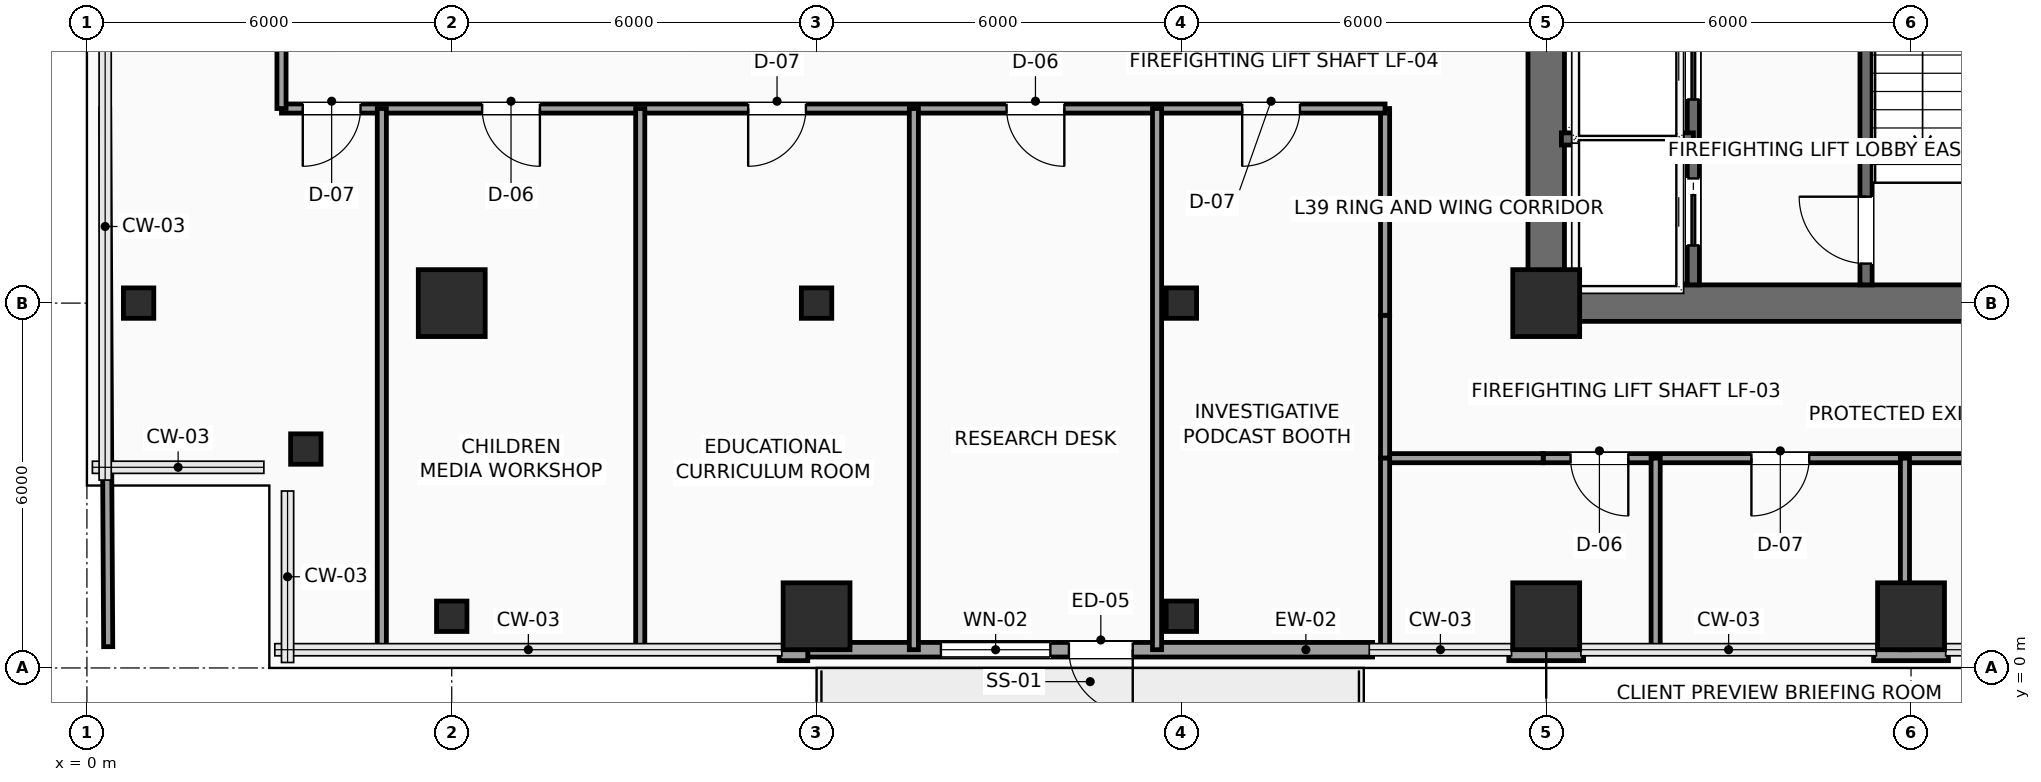
"""IFC4 building model, lengths in metres.
Left out: names, types, materials, properties, quantities, classifications, styles, units other than length and angle.
Written with IfcOpenShell. Run it as: python <this file> out.ifc"""

import sys

from ifc_helpers import new_model, si_unit, direction, frame, frame_2d, origin, origin_2d, place, context, subcontext, project, spatial, rectangle, hollow_rectangle, extrude, element, fill, save


model = new_model("IFC4")
c1 = context("Model", 3, precision=1e-05, world=origin(), true_north=direction((0.0, 1.0)))
c2 = subcontext(c1, "Body", "Model", "MODEL_VIEW")
j1 = project(units=[si_unit("LENGTHUNIT", "METRE"), si_unit("PLANEANGLEUNIT", "RADIAN")], contexts=[c1])
p1 = place(None, origin())
s1 = spatial("IfcSite", under=j1, at=p1, CompositionType="ELEMENT")
p2 = place(p1, origin())
s2 = spatial("IfcBuilding", under=s1, at=p2, CompositionType="ELEMENT")
p3 = place(p2, frame((0.0, 0.0, 160.65)))
s3 = spatial("IfcBuildingStorey", under=s2, at=p3, CompositionType="ELEMENT", Elevation=160.65)
p4 = place(p3, frame((24.0, 6.0, 0.0), z_axis=(0.0, 0.0, 1.0), x_axis=(1.0, 0.0, 0.0)))
e1 = element("IfcColumn", 1, at=p4, inside=s3, PredefinedType="COLUMN", context=c2, shape_type="SweptSolid", body=[
    extrude(rectangle(XDim=1.1, YDim=1.1, at=origin_2d()), origin(), (0.0, 0.0, 1.0), 3.75),
])
for number, where, z_axis, x_axis in (
    (2, (3.6, 3.6, 0.0), (0.0, 0.0, 1.0), (1.0, 0.0, 0.0)),
    (3, (0.85, 6.0, 0.0), (0.0, 0.0, 1.0), (1.0, 0.0, 0.0)),
    (4, (6.0, 0.85, 0.0), (0.0, 0.0, 1.0), (1.0, 0.0, 0.0)),
):
    element("IfcColumn", number, at=place(p3, frame(where, z_axis=z_axis, x_axis=x_axis)), inside=s3, PredefinedType="COLUMN", context=c2, shape_type="SweptSolid", body=[
        extrude(hollow_rectangle(XDim=0.5, YDim=0.5, WallThickness=0.025, InnerFilletRadius=0.025, OuterFilletRadius=0.04, at=origin_2d()), origin(), (0.0, 0.0, 1.0), 3.75),
    ])
for number, where, z_axis, x_axis in (
    (5, (6.0, 6.0, 0.0), (0.0, 0.0, 1.0), (1.0, 0.0, 0.0)),
    (6, (12.0, 0.85, 0.0), (0.0, 0.0, 1.0), (1.0, 0.0, 0.0)),
):
    element("IfcColumn", number, at=place(p3, frame(where, z_axis=z_axis, x_axis=x_axis)), inside=s3, PredefinedType="COLUMN", context=c2, shape_type="SweptSolid", body=[
        extrude(rectangle(XDim=1.1, YDim=1.1, at=origin_2d()), origin(), (0.0, 0.0, 1.0), 3.75),
    ])
for number, where, z_axis, x_axis in (
    (7, (12.0, 6.0, 0.0), (0.0, 0.0, 1.0), (1.0, 0.0, 0.0)),
    (8, (18.0, 0.85, 0.0), (0.0, 0.0, 1.0), (1.0, 0.0, 0.0)),
    (9, (18.0, 6.0, 0.0), (0.0, 0.0, 1.0), (1.0, 0.0, 0.0)),
):
    element("IfcColumn", number, at=place(p3, frame(where, z_axis=z_axis, x_axis=x_axis)), inside=s3, PredefinedType="COLUMN", context=c2, shape_type="SweptSolid", body=[
        extrude(hollow_rectangle(XDim=0.5, YDim=0.5, WallThickness=0.025, InnerFilletRadius=0.025, OuterFilletRadius=0.04, at=origin_2d()), origin(), (0.0, 0.0, 1.0), 3.75),
    ])
for number, where, z_axis, x_axis in (
    (10, (24.0, 0.85, 0.0), (0.0, 0.0, 1.0), (1.0, 0.0, 0.0)),
    (11, (30.0, 0.85, 0.0), (0.0, 0.0, 1.0), (1.0, 0.0, 0.0)),
):
    element("IfcColumn", number, at=place(p3, frame(where, z_axis=z_axis, x_axis=x_axis)), inside=s3, PredefinedType="COLUMN", context=c2, shape_type="SweptSolid", body=[
        extrude(rectangle(XDim=1.1, YDim=1.1, at=origin_2d()), origin(), (0.0, 0.0, 1.0), 3.75),
    ])
p5 = place(p3, frame((21.145, 0.3, 0.0), z_axis=(0.0, 0.0, 1.0), x_axis=(-1.0, 0.0, 0.0)))
e12 = element("IfcWall", 12, at=p5, inside=s3, PredefinedType="SOLIDWALL", context=c2, shape_type="SweptSolid", body=[
    extrude(rectangle(XDim=9.29, YDim=0.24, at=frame_2d((4.645, 0.0))), origin(), (0.0, 0.0, 1.0), 3.425),
])
p6 = place(p5, frame((3.945, 0.0, 0.0)))
e13 = element("IfcOpeningElement", 13, at=p6, cuts=e12, PredefinedType="OPENING", context=c2, shape_type="SweptSolid", body=[
    extrude(rectangle(XDim=1.05, YDim=2.2, at=frame_2d((0.525, 1.1))), frame((0.0, 0.13, 0.0), z_axis=(0.0, -1.0, 0.0), x_axis=(1.0, 0.0, 0.0)), (0.0, 0.0, 1.0), 0.26),
])
p7 = place(p5, frame((5.3, 0.0, 0.85)))
e14 = element("IfcOpeningElement", 14, at=p7, cuts=e12, PredefinedType="OPENING", context=c2, shape_type="SweptSolid", body=[
    extrude(rectangle(XDim=1.8, YDim=2.1, at=frame_2d((0.9, 1.05))), frame((0.0, 0.13, 0.0), z_axis=(0.0, -1.0, 0.0), x_axis=(1.0, 0.0, 0.0)), (0.0, 0.0, 1.0), 0.26),
])
for number, where, z_axis, x_axis in (
    (15, (30.615, 0.24, 0.0), (0.0, 0.0, 1.0), (-1.0, 0.0, 0.0)),
    (16, (24.615, 0.24, 0.0), (0.0, 0.0, 1.0), (-1.0, 0.0, 0.0)),
):
    element("IfcWall", number, at=place(p3, frame(where, z_axis=z_axis, x_axis=x_axis)), inside=s3, PredefinedType="SOLIDWALL", context=c2, shape_type="SweptSolid", body=[
        extrude(rectangle(XDim=1.23, YDim=0.24, at=frame_2d((0.615, 0.0))), origin(), (0.0, 0.0, 1.0), 3.425),
    ])
p8 = place(p3, frame((11.855, 0.24, 0.0), z_axis=(0.0, 0.0, 1.0), x_axis=(-1.0, 0.0, 0.0)))
e17 = element("IfcWall", 17, at=p8, inside=s3, PredefinedType="SOLIDWALL", context=c2, shape_type="SweptSolid", body=[
    extrude(rectangle(XDim=0.47, YDim=0.24, at=frame_2d((0.235, 0.0))), origin(), (0.0, 0.0, 1.0), 3.425),
])
p9 = place(p3, frame((24.0, 6.0, 0.0), z_axis=(0.0, 0.0, 1.0), x_axis=(1.0, 0.0, 0.0)))
e18 = element("IfcWall", 18, at=p9, inside=s3, PredefinedType="SHEAR", context=c2, shape_type="SweptSolid", body=[
    extrude(rectangle(XDim=9.6, YDim=0.6, at=frame_2d((4.8, 0.0))), origin(), (0.0, 0.0, 1.0), 3.425),
])
p10 = place(p3, frame((24.0, 6.0, 0.0), z_axis=(0.0, 0.0, 1.0), x_axis=(0.0, 1.0, 0.0)))
e19 = element("IfcWall", 19, at=p10, inside=s3, PredefinedType="SHEAR", context=c2, shape_type="SweptSolid", body=[
    extrude(rectangle(XDim=12.0, YDim=0.6, at=frame_2d((6.0, 0.0))), origin(), (0.0, 0.0, 1.0), 3.425),
])
p11 = place(p10, frame((7.15, 0.0, 0.0)))
e20 = element("IfcOpeningElement", 20, at=p11, cuts=e19, PredefinedType="OPENING", context=c2, shape_type="SweptSolid", body=[
    extrude(rectangle(XDim=1.6, YDim=2.3, at=frame_2d((0.8, 1.15))), frame((0.0, 0.31, 0.0), z_axis=(0.0, -1.0, 0.0), x_axis=(1.0, 0.0, 0.0)), (0.0, 0.0, 1.0), 0.62),
])
p12 = place(p3, frame((29.26, 6.3, 0.0), z_axis=(0.0, 0.0, 1.0), x_axis=(0.0, 1.0, 0.0)))
e21 = element("IfcWall", 21, at=p12, inside=s3, PredefinedType="SHEAR", context=c2, shape_type="SweptSolid", body=[
    extrude(rectangle(XDim=8.88, YDim=0.2, at=frame_2d((4.44, 0.0))), origin(), (0.0, 0.0, 1.0), 3.425),
])
p13 = place(p12, frame((0.35, 0.0, 0.0)))
e22 = element("IfcOpeningElement", 22, at=p13, cuts=e21, PredefinedType="OPENING", context=c2, shape_type="SweptSolid", body=[
    extrude(rectangle(XDim=1.1, YDim=2.2, at=frame_2d((0.55, 1.1))), frame((0.0, 0.11, 0.0), z_axis=(0.0, -1.0, 0.0), x_axis=(1.0, 0.0, 0.0)), (0.0, 0.0, 1.0), 0.22),
])
p14 = place(p3, frame((26.42, 6.3, 0.0), z_axis=(0.0, 0.0, 1.0), x_axis=(0.0, 1.0, 0.0)))
e23 = element("IfcWall", 23, at=p14, inside=s3, PredefinedType="SHEAR", context=c2, shape_type="SweptSolid", body=[
    extrude(rectangle(XDim=4.95, YDim=0.2, at=frame_2d((2.475, 0.0))), origin(), (0.0, 0.0, 1.0), 3.425),
])
p15 = place(p14, frame((0.65, 0.0, 0.0)))
e24 = element("IfcOpeningElement", 24, at=p15, cuts=e23, PredefinedType="OPENING", context=c2, shape_type="SweptSolid", body=[
    extrude(rectangle(XDim=1.1, YDim=2.2, at=frame_2d((0.55, 1.1))), frame((0.0, 0.11, 0.0), z_axis=(0.0, -1.0, 0.0), x_axis=(1.0, 0.0, 0.0)), (0.0, 0.0, 1.0), 0.22),
])
p16 = place(p14, frame((3.05, 0.0, 0.0)))
e25 = element("IfcOpeningElement", 25, at=p16, cuts=e23, PredefinedType="OPENING", context=c2, shape_type="SweptSolid", body=[
    extrude(rectangle(XDim=1.1, YDim=2.2, at=frame_2d((0.55, 1.1))), frame((0.0, 0.11, 0.0), z_axis=(0.0, -1.0, 0.0), x_axis=(1.0, 0.0, 0.0)), (0.0, 0.0, 1.0), 0.22),
])
p17 = place(p3, frame((24.25, 8.7, 0.0), z_axis=(0.0, 0.0, 1.0), x_axis=(1.0, 0.0, 0.0)))
e26 = element("IfcWall", 26, at=p17, inside=s3, PredefinedType="SHEAR", context=c2, shape_type="SweptSolid", body=[
    extrude(rectangle(XDim=2.17, YDim=0.2, at=frame_2d((1.085, 0.0))), origin(), (0.0, 0.0, 1.0), 3.425),
])
p18 = place(p3, frame((36.15, 3.45, 0.0), z_axis=(0.0, 0.0, 1.0), x_axis=(-1.0, 0.0, 0.0)))
e27 = element("IfcWall", 27, at=p18, inside=s3, PredefinedType="PARTITIONING", context=c2, shape_type="SweptSolid", body=[
    extrude(rectangle(XDim=12.2, YDim=0.15, at=frame_2d((6.1, 0.0))), origin(), (0.0, 0.0, 1.0), 2.967),
])
p19 = place(p18, frame((10.8, 0.0, 0.0)))
e28 = element("IfcOpeningElement", 28, at=p19, cuts=e27, PredefinedType="OPENING", context=c2, shape_type="SweptSolid", body=[
    extrude(rectangle(XDim=0.95, YDim=2.15, at=frame_2d((0.475, 1.075))), frame((0.0, 0.085, 0.0), z_axis=(0.0, -1.0, 0.0), x_axis=(1.0, 0.0, 0.0)), (0.0, 0.0, 1.0), 0.17),
])
p20 = place(p18, frame((7.825, 0.0, 0.0)))
e29 = element("IfcOpeningElement", 29, at=p20, cuts=e27, PredefinedType="OPENING", context=c2, shape_type="SweptSolid", body=[
    extrude(rectangle(XDim=0.95, YDim=2.15, at=frame_2d((0.475, 1.075))), frame((0.0, 0.085, 0.0), z_axis=(0.0, -1.0, 0.0), x_axis=(1.0, 0.0, 0.0)), (0.0, 0.0, 1.0), 0.17),
])
p21 = place(p18, frame((3.675, 0.0, 0.0)))
e30 = element("IfcOpeningElement", 30, at=p21, cuts=e27, PredefinedType="OPENING", context=c2, shape_type="SweptSolid", body=[
    extrude(rectangle(XDim=0.95, YDim=2.15, at=frame_2d((0.475, 1.075))), frame((0.0, 0.085, 0.0), z_axis=(0.0, -1.0, 0.0), x_axis=(1.0, 0.0, 0.0)), (0.0, 0.0, 1.0), 0.17),
])
p22 = place(p3, frame((23.95, 3.45, 0.0), z_axis=(0.0, 0.0, 1.0), x_axis=(-1.0, 0.0, 0.0)))
e31 = element("IfcWall", 31, at=p22, inside=s3, PredefinedType="PARTITIONING", context=c2, shape_type="SweptSolid", body=[
    extrude(rectangle(XDim=2.6, YDim=0.15, at=frame_2d((1.3, 0.0))), origin(), (0.0, 0.0, 1.0), 2.967),
])
p23 = place(p3, frame((21.35, 3.45, 0.0), z_axis=(0.0, 0.0, 1.0), x_axis=(0.0, 1.0, 0.0)))
e32 = element("IfcWall", 32, at=p23, inside=s3, PredefinedType="PARTITIONING", context=c2, shape_type="SweptSolid", body=[
    extrude(rectangle(XDim=2.35, YDim=0.15, at=frame_2d((1.175, 0.0))), origin(), (0.0, 0.0, 1.0), 3.425),
])
p24 = place(p3, frame((21.35, 5.8, 0.0), z_axis=(0.0, 0.0, 1.0), x_axis=(0.0, 1.0, 0.0)))
e33 = element("IfcWall", 33, at=p24, inside=s3, PredefinedType="PARTITIONING", context=c2, shape_type="SweptSolid", body=[
    extrude(rectangle(XDim=3.4, YDim=0.15, at=frame_2d((1.7, 0.0))), origin(), (0.0, 0.0, 1.0), 3.425),
])
p25 = place(p3, frame((21.35, 9.2, 0.0), z_axis=(0.0, 0.0, 1.0), x_axis=(-1.0, 0.0, 0.0)))
e34 = element("IfcWall", 34, at=p25, inside=s3, PredefinedType="PARTITIONING", context=c2, shape_type="SweptSolid", body=[
    extrude(rectangle(XDim=18.15, YDim=0.15, at=frame_2d((9.075, 0.0))), origin(), (0.0, 0.0, 1.0), 2.967),
])
p26 = place(p25, frame((16.85, 0.0, 0.0)))
e35 = element("IfcOpeningElement", 35, at=p26, cuts=e34, PredefinedType="OPENING", context=c2, shape_type="SweptSolid", body=[
    extrude(rectangle(XDim=0.95, YDim=2.15, at=frame_2d((0.475, 1.075))), frame((0.0, 0.085, 0.0), z_axis=(0.0, -1.0, 0.0), x_axis=(1.0, 0.0, 0.0)), (0.0, 0.0, 1.0), 0.17),
])
p27 = place(p25, frame((13.9, 0.0, 0.0)))
e36 = element("IfcOpeningElement", 36, at=p27, cuts=e34, PredefinedType="OPENING", context=c2, shape_type="SweptSolid", body=[
    extrude(rectangle(XDim=0.95, YDim=2.15, at=frame_2d((0.475, 1.075))), frame((0.0, 0.085, 0.0), z_axis=(0.0, -1.0, 0.0), x_axis=(1.0, 0.0, 0.0)), (0.0, 0.0, 1.0), 0.17),
])
p28 = place(p25, frame((9.525, 0.0, 0.0)))
e37 = element("IfcOpeningElement", 37, at=p28, cuts=e34, PredefinedType="OPENING", context=c2, shape_type="SweptSolid", body=[
    extrude(rectangle(XDim=0.95, YDim=2.15, at=frame_2d((0.475, 1.075))), frame((0.0, 0.085, 0.0), z_axis=(0.0, -1.0, 0.0), x_axis=(1.0, 0.0, 0.0)), (0.0, 0.0, 1.0), 0.17),
])
p29 = place(p25, frame((5.275, 0.0, 0.0)))
e38 = element("IfcOpeningElement", 38, at=p29, cuts=e34, PredefinedType="OPENING", context=c2, shape_type="SweptSolid", body=[
    extrude(rectangle(XDim=0.95, YDim=2.15, at=frame_2d((0.475, 1.075))), frame((0.0, 0.085, 0.0), z_axis=(0.0, -1.0, 0.0), x_axis=(1.0, 0.0, 0.0)), (0.0, 0.0, 1.0), 0.17),
])
p30 = place(p25, frame((1.4, 0.0, 0.0)))
e39 = element("IfcOpeningElement", 39, at=p30, cuts=e34, PredefinedType="OPENING", context=c2, shape_type="SweptSolid", body=[
    extrude(rectangle(XDim=0.95, YDim=2.15, at=frame_2d((0.475, 1.075))), frame((0.0, 0.085, 0.0), z_axis=(0.0, -1.0, 0.0), x_axis=(1.0, 0.0, 0.0)), (0.0, 0.0, 1.0), 0.17),
])
p31 = place(p3, frame((3.2, 9.2, 0.0), z_axis=(0.0, 0.0, 1.0), x_axis=(0.0, 1.0, 0.0)))
e40 = element("IfcWall", 40, at=p31, inside=s3, PredefinedType="PARTITIONING", context=c2, shape_type="SweptSolid", body=[
    extrude(rectangle(XDim=2.05, YDim=0.15, at=frame_2d((1.025, 0.0))), origin(), (0.0, 0.0, 1.0), 3.425),
])
for number, where, z_axis, x_axis in (
    (41, (21.35, 0.3, 0.0), (0.0, 0.0, 1.0), (0.0, 1.0, 0.0)),
    (42, (25.8, 0.3, 0.0), (0.0, 0.0, 1.0), (0.0, 1.0, 0.0)),
    (43, (29.9, 0.3, 0.0), (0.0, 0.0, 1.0), (0.0, 1.0, 0.0)),
):
    element("IfcWall", number, at=place(p3, frame(where, z_axis=z_axis, x_axis=x_axis)), inside=s3, PredefinedType="PARTITIONING", context=c2, shape_type="SweptSolid", body=[
        extrude(rectangle(XDim=3.15, YDim=0.15, at=frame_2d((1.575, 0.0))), origin(), (0.0, 0.0, 1.0), 3.425),
    ])
p32 = place(p3, frame((0.35, 0.35, 0.0), z_axis=(0.0, 0.0, 1.0), x_axis=(-0.005655237989, 0.999984009014, 0.0)))
e44 = element("IfcWall", 44, at=p32, inside=s3, PredefinedType="PARTITIONING", context=c2, shape_type="SweptSolid", body=[
    extrude(rectangle(XDim=8.85, YDim=0.15, at=frame_2d((4.425, 0.0))), origin(), (0.0, 0.0, 1.0), 3.425),
])
for number, where, z_axis, x_axis in (
    (45, (4.85, 0.3, 0.0), (0.0, 0.0, 1.0), (0.0, 1.0, 0.0)),
    (46, (9.1, 0.3, 0.0), (0.0, 0.0, 1.0), (0.0, 1.0, 0.0)),
    (47, (13.6, 0.3, 0.0), (0.0, 0.0, 1.0), (0.0, 1.0, 0.0)),
    (48, (17.6, 0.3, 0.0), (0.0, 0.0, 1.0), (0.0, 1.0, 0.0)),
):
    element("IfcWall", number, at=place(p3, frame(where, z_axis=z_axis, x_axis=x_axis)), inside=s3, PredefinedType="PARTITIONING", context=c2, shape_type="SweptSolid", body=[
        extrude(rectangle(XDim=8.9, YDim=0.15, at=frame_2d((4.45, 0.0))), origin(), (0.0, 0.0, 1.0), 3.425),
    ])
p33 = place(p6, origin())
e49 = element("IfcDoor", 49, at=p33, inside=s3, OperationType="SINGLE_SWING_LEFT", PredefinedType="DOOR", context=c2, shape_type="SweptSolid", body=[
    extrude(rectangle(XDim=1.05, YDim=2.2, at=frame_2d((0.525, 1.1))), frame((0.0, 0.025, 0.0), z_axis=(0.0, -1.0, 0.0), x_axis=(1.0, 0.0, 0.0)), (0.0, 0.0, 1.0), 0.05),
])
fill(e13, e49)
p34 = place(p7, origin())
e50 = element("IfcWindow", 50, at=p34, inside=s3, PartitioningType="SINGLE_PANEL", PredefinedType="WINDOW", context=c2, shape_type="SweptSolid", body=[
    extrude(rectangle(XDim=1.8, YDim=2.1, at=frame_2d((0.9, 1.05))), frame((0.0, 0.03, 0.0), z_axis=(0.0, -1.0, 0.0), x_axis=(1.0, 0.0, 0.0)), (0.0, 0.0, 1.0), 0.06),
])
fill(e14, e50)
p35 = place(p13, origin())
e51 = element("IfcDoor", 51, at=p35, inside=s3, OperationType="SINGLE_SWING_RIGHT", PredefinedType="DOOR", context=c2, shape_type="SweptSolid", body=[
    extrude(rectangle(XDim=1.1, YDim=2.2, at=frame_2d((0.55, 1.1))), frame((0.0, 0.025, 0.0), z_axis=(0.0, -1.0, 0.0), x_axis=(1.0, 0.0, 0.0)), (0.0, 0.0, 1.0), 0.05),
])
fill(e22, e51)
p36 = place(p15, origin())
e52 = element("IfcDoor", 52, at=p36, inside=s3, OperationType="SLIDING_TO_LEFT", PredefinedType="DOOR", context=c2, shape_type="SweptSolid", body=[
    extrude(rectangle(XDim=1.1, YDim=2.2, at=frame_2d((0.55, 1.1))), frame((0.0, 0.025, 0.0), z_axis=(0.0, -1.0, 0.0), x_axis=(1.0, 0.0, 0.0)), (0.0, 0.0, 1.0), 0.05),
])
fill(e24, e52)
p37 = place(p16, origin())
e53 = element("IfcDoor", 53, at=p37, inside=s3, OperationType="SLIDING_TO_LEFT", PredefinedType="DOOR", context=c2, shape_type="SweptSolid", body=[
    extrude(rectangle(XDim=1.1, YDim=2.2, at=frame_2d((0.55, 1.1))), frame((0.0, 0.025, 0.0), z_axis=(0.0, -1.0, 0.0), x_axis=(1.0, 0.0, 0.0)), (0.0, 0.0, 1.0), 0.05),
])
fill(e25, e53)
p38 = place(p19, origin())
e54 = element("IfcDoor", 54, at=p38, inside=s3, OperationType="SINGLE_SWING_LEFT", PredefinedType="DOOR", context=c2, shape_type="SweptSolid", body=[
    extrude(rectangle(XDim=0.95, YDim=2.15, at=frame_2d((0.475, 1.075))), frame((0.0, 0.025, 0.0), z_axis=(0.0, -1.0, 0.0), x_axis=(1.0, 0.0, 0.0)), (0.0, 0.0, 1.0), 0.05),
])
fill(e28, e54)
p39 = place(p20, origin())
e55 = element("IfcDoor", 55, at=p39, inside=s3, OperationType="SINGLE_SWING_RIGHT", PredefinedType="DOOR", context=c2, shape_type="SweptSolid", body=[
    extrude(rectangle(XDim=0.95, YDim=2.15, at=frame_2d((0.475, 1.075))), frame((0.0, 0.025, 0.0), z_axis=(0.0, -1.0, 0.0), x_axis=(1.0, 0.0, 0.0)), (0.0, 0.0, 1.0), 0.05),
])
fill(e29, e55)
p40 = place(p26, origin())
e56 = element("IfcDoor", 56, at=p40, inside=s3, OperationType="SINGLE_SWING_RIGHT", PredefinedType="DOOR", context=c2, shape_type="SweptSolid", body=[
    extrude(rectangle(XDim=0.95, YDim=2.15, at=frame_2d((0.475, 1.075))), frame((0.0, 0.025, 0.0), z_axis=(0.0, -1.0, 0.0), x_axis=(1.0, 0.0, 0.0)), (0.0, 0.0, 1.0), 0.05),
])
fill(e35, e56)
p41 = place(p27, origin())
e57 = element("IfcDoor", 57, at=p41, inside=s3, OperationType="SINGLE_SWING_LEFT", PredefinedType="DOOR", context=c2, shape_type="SweptSolid", body=[
    extrude(rectangle(XDim=0.95, YDim=2.15, at=frame_2d((0.475, 1.075))), frame((0.0, 0.025, 0.0), z_axis=(0.0, -1.0, 0.0), x_axis=(1.0, 0.0, 0.0)), (0.0, 0.0, 1.0), 0.05),
])
fill(e36, e57)
p42 = place(p28, origin())
e58 = element("IfcDoor", 58, at=p42, inside=s3, OperationType="SINGLE_SWING_RIGHT", PredefinedType="DOOR", context=c2, shape_type="SweptSolid", body=[
    extrude(rectangle(XDim=0.95, YDim=2.15, at=frame_2d((0.475, 1.075))), frame((0.0, 0.025, 0.0), z_axis=(0.0, -1.0, 0.0), x_axis=(1.0, 0.0, 0.0)), (0.0, 0.0, 1.0), 0.05),
])
fill(e37, e58)
p43 = place(p29, origin())
e59 = element("IfcDoor", 59, at=p43, inside=s3, OperationType="SINGLE_SWING_LEFT", PredefinedType="DOOR", context=c2, shape_type="SweptSolid", body=[
    extrude(rectangle(XDim=0.95, YDim=2.15, at=frame_2d((0.475, 1.075))), frame((0.0, 0.025, 0.0), z_axis=(0.0, -1.0, 0.0), x_axis=(1.0, 0.0, 0.0)), (0.0, 0.0, 1.0), 0.05),
])
fill(e38, e59)
p44 = place(p30, origin())
e60 = element("IfcDoor", 60, at=p44, inside=s3, OperationType="SINGLE_SWING_RIGHT", PredefinedType="DOOR", context=c2, shape_type="SweptSolid", body=[
    extrude(rectangle(XDim=0.95, YDim=2.15, at=frame_2d((0.475, 1.075))), frame((0.0, 0.025, 0.0), z_axis=(0.0, -1.0, 0.0), x_axis=(1.0, 0.0, 0.0)), (0.0, 0.0, 1.0), 0.05),
])
fill(e39, e60)
save(model, sys.argv[1])
